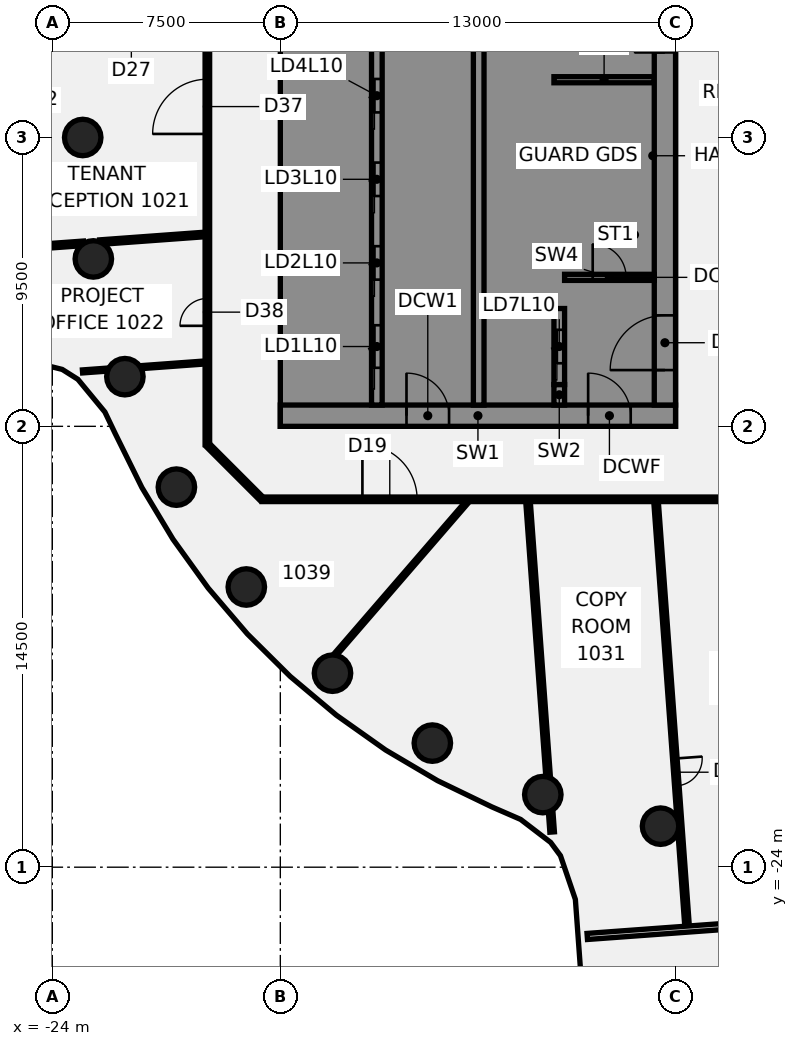
"""IFC4 building model, lengths in metres.
Left out: names, types, materials, properties, quantities, classifications, styles, units other than length and angle.
Written with IfcOpenShell. Run it as: python <this file> out.ifc"""

import sys

from ifc_helpers import new_model, si_unit, direction, frame, frame_2d, origin, origin_2d, place, context, subcontext, project, spatial, polyline, rectangle, circle, outline, extrude, element, fill, save


model = new_model("IFC4")
c1 = context("Model", 3, precision=1e-05, world=origin(), true_north=direction((0.0, 1.0)))
c2 = subcontext(c1, "Body", "Model", "MODEL_VIEW")
j1 = project(units=[si_unit("LENGTHUNIT", "METRE"), si_unit("PLANEANGLEUNIT", "RADIAN")], contexts=[c1])
p1 = place(None, origin())
s1 = spatial("IfcSite", under=j1, at=p1, CompositionType="ELEMENT")
p2 = place(p1, origin())
s2 = spatial("IfcBuilding", under=s1, at=p2, CompositionType="ELEMENT")
p3 = place(p2, frame((0.0, 0.0, 49.0)))
s3 = spatial("IfcBuildingStorey", under=s2, at=p3, CompositionType="ELEMENT", Elevation=49.0)
for number, where, z_axis, x_axis in (
    (1, (-23.0, 0.0, -0.14), (0.0, 0.0, 1.0), (1.0, 0.0, 0.0)),
    (2, (-22.651, -3.994, -0.14), (0.0, 0.0, 1.0), (1.0, 0.0, 0.0)),
    (3, (-21.613, -7.866, -0.14), (0.0, 0.0, 1.0), (1.0, 0.0, 0.0)),
    (4, (-19.919, -11.5, -0.14), (0.0, 0.0, 1.0), (1.0, 0.0, 0.0)),
    (5, (-17.619, -14.784, -0.14), (0.0, 0.0, 1.0), (1.0, 0.0, 0.0)),
    (6, (-14.784, -17.619, -0.14), (0.0, 0.0, 1.0), (1.0, 0.0, 0.0)),
    (7, (-11.5, -19.919, -0.14), (0.0, 0.0, 1.0), (1.0, 0.0, 0.0)),
    (8, (-7.866, -21.613, -0.14), (0.0, 0.0, 1.0), (1.0, 0.0, 0.0)),
    (9, (-3.994, -22.651, -0.14), (0.0, 0.0, 1.0), (1.0, 0.0, 0.0)),
):
    element("IfcColumn", number, at=place(p3, frame(where, z_axis=z_axis, x_axis=x_axis)), inside=s3, PredefinedType="COLUMN", context=c2, shape_type="SweptSolid", body=[
        extrude(circle(Radius=0.6, at=origin_2d()), origin(), (0.0, 0.0, 1.0), 3.75),
    ])
p4 = place(p3, frame((-8.353, -11.965, 0.0), z_axis=(0.0, 0.0, 1.0), x_axis=(0.072816342266, -0.99734536661, 0.0)))
e10 = element("IfcWall", 10, at=p4, inside=s3, PredefinedType="PARTITIONING", context=c2, shape_type="SweptSolid", body=[
    extrude(rectangle(XDim=9.11, YDim=0.15, at=frame_2d((4.555, 0.0))), origin(), (0.0, 0.0, 1.0), 3.01),
])
p5 = place(p3, frame((-7.609, -22.154, 0.0), z_axis=(0.0, 0.0, 1.0), x_axis=(0.072804156196, -0.997346256242, 0.0)))
e11 = element("IfcWall", 11, at=p5, inside=s3, PredefinedType="PARTITIONING", context=c2, shape_type="SweptSolid", body=[
    extrude(rectangle(XDim=0.691, YDim=0.15, at=frame_2d((0.345, 0.0))), origin(), (0.0, 0.0, 1.0), 3.01),
])
p6 = place(p3, frame((-4.142, -11.965, 0.0), z_axis=(0.0, 0.0, 1.0), x_axis=(0.072880977725, -0.99734064546, 0.0)))
e12 = element("IfcWall", 12, at=p6, inside=s3, PredefinedType="PARTITIONING", context=c2, shape_type="SweptSolid", body=[
    extrude(rectangle(XDim=14.016, YDim=0.15, at=frame_2d((7.008, 0.0))), origin(), (0.0, 0.0, 1.0), 3.01),
])
p7 = place(p6, frame((8.485, 0.0, 0.0)))
e13 = element("IfcOpeningElement", 13, at=p7, cuts=e12, PredefinedType="OPENING", context=c2, shape_type="SweptSolid", body=[
    extrude(rectangle(XDim=0.9, YDim=2.1, at=frame_2d((0.45, 1.05))), frame((0.0, 0.085, 0.0), z_axis=(0.0, -1.0, 0.0), x_axis=(1.0, 0.0, 0.0)), (0.0, 0.0, 1.0), 0.17),
])
p8 = place(p3, frame((-18.872, -10.128, 0.0), z_axis=(0.0, 0.0, 1.0), x_axis=(0.707106781187, -0.707106781187, 0.0)))
e14 = element("IfcWall", 14, at=p8, inside=s3, PredefinedType="PARTITIONING", context=c2, shape_type="SweptSolid", body=[
    extrude(rectangle(XDim=2.465, YDim=0.15, at=frame_2d((1.232, 0.0))), origin(), (0.0, 0.0, 1.0), 3.01),
])
p9 = place(p3, frame((-17.1, -11.9, 0.0), z_axis=(0.0, 0.0, 1.0), x_axis=(1.0, 0.0, 0.0)))
e15 = element("IfcWall", 15, at=p9, inside=s3, PredefinedType="PARTITIONING", context=c2, shape_type="SweptSolid", body=[
    extrude(rectangle(XDim=34.165, YDim=0.15, at=frame_2d((17.083, 0.0))), origin(), (0.0, 0.0, 1.0), 3.01),
])
p10 = place(p9, frame((15.503, 0.0, 0.0)))
e16 = element("IfcOpeningElement", 16, at=p10, cuts=e15, PredefinedType="OPENING", context=c2, shape_type="SweptSolid", body=[
    extrude(rectangle(XDim=1.8, YDim=2.1, at=frame_2d((0.9, 1.05))), frame((0.0, 0.085, 0.0), z_axis=(0.0, -1.0, 0.0), x_axis=(1.0, 0.0, 0.0)), (0.0, 0.0, 1.0), 0.17),
])
p11 = place(p9, frame((3.3, 0.0, 0.0)))
e17 = element("IfcOpeningElement", 17, at=p11, cuts=e15, PredefinedType="OPENING", context=c2, shape_type="SweptSolid", body=[
    extrude(rectangle(XDim=1.8, YDim=2.1, at=frame_2d((0.9, 1.05))), frame((0.0, 0.085, 0.0), z_axis=(0.0, -1.0, 0.0), x_axis=(1.0, 0.0, 0.0)), (0.0, 0.0, 1.0), 0.17),
])
p12 = place(p9, frame((25.782, 0.0, 0.0)))
e18 = element("IfcOpeningElement", 18, at=p12, cuts=e15, PredefinedType="OPENING", context=c2, shape_type="SweptSolid", body=[
    extrude(rectangle(XDim=1.8, YDim=2.1, at=frame_2d((0.9, 1.05))), frame((0.0, 0.085, 0.0), z_axis=(0.0, -1.0, 0.0), x_axis=(1.0, 0.0, 0.0)), (0.0, 0.0, 1.0), 0.17),
])
p13 = place(p3, frame((-25.472, -3.663, 0.0), z_axis=(0.0, 0.0, 1.0), x_axis=(0.997346837162, 0.072796197716, 0.0)))
e19 = element("IfcWall", 19, at=p13, inside=s3, PredefinedType="PARTITIONING", context=c2, shape_type="SweptSolid", body=[
    extrude(rectangle(XDim=2.509, YDim=0.15, at=frame_2d((1.254, 0.0))), origin(), (0.0, 0.0, 1.0), 3.01),
])
p14 = place(p3, frame((-22.437, -3.441, 0.0), z_axis=(0.0, 0.0, 1.0), x_axis=(0.99734640783, 0.072802079559, 0.0)))
e20 = element("IfcWall", 20, at=p14, inside=s3, PredefinedType="PARTITIONING", context=c2, shape_type="SweptSolid", body=[
    extrude(rectangle(XDim=3.481, YDim=0.15, at=frame_2d((1.74, 0.0))), origin(), (0.0, 0.0, 1.0), 3.01),
])
p15 = place(p3, frame((-23.007, -7.694, 0.0), z_axis=(0.0, 0.0, 1.0), x_axis=(0.997348002783, 0.072780226335, 0.0)))
e21 = element("IfcWall", 21, at=p15, inside=s3, PredefinedType="PARTITIONING", context=c2, shape_type="SweptSolid", body=[
    extrude(rectangle(XDim=0.849, YDim=0.1, at=frame_2d((0.424, 0.0))), origin(), (0.0, 0.0, 1.0), 3.01),
])
p16 = place(p3, frame((-21.092, -7.554, 0.0), z_axis=(0.0, 0.0, 1.0), x_axis=(0.997342635189, 0.072853744132, 0.0)))
e22 = element("IfcWall", 22, at=p16, inside=s3, PredefinedType="PARTITIONING", context=c2, shape_type="SweptSolid", body=[
    extrude(rectangle(XDim=2.138, YDim=0.1, at=frame_2d((1.069, 0.0))), origin(), (0.0, 0.0, 1.0), 3.01),
])
p17 = place(p3, frame((-6.404, -26.278, 0.0), z_axis=(0.0, 0.0, 1.0), x_axis=(0.9973396504, 0.072894593347, 0.0)))
e23 = element("IfcWall", 23, at=p17, inside=s3, PredefinedType="PARTITIONING", context=c2, shape_type="SweptSolid", body=[
    extrude(rectangle(XDim=13.447, YDim=0.2, at=frame_2d((6.724, 0.0))), origin(), (0.0, 0.0, 1.0), 3.01),
])
p18 = place(p17, frame((5.799, 0.0, 0.0)))
e24 = element("IfcOpeningElement", 24, at=p18, cuts=e23, PredefinedType="OPENING", context=c2, shape_type="SweptSolid", body=[
    extrude(rectangle(XDim=1.4, YDim=2.1, at=frame_2d((0.7, 1.05))), frame((0.0, 0.11, 0.0), z_axis=(0.0, -1.0, 0.0), x_axis=(1.0, 0.0, 0.0)), (0.0, 0.0, 1.0), 0.22),
])
p19 = place(p3, frame((-14.71, -17.029, 0.0), z_axis=(0.0, 0.0, 1.0), x_axis=(0.653745883249, 0.756714160126, 0.0)))
e25 = element("IfcWall", 25, at=p19, inside=s3, PredefinedType="PARTITIONING", context=c2, shape_type="SweptSolid", body=[
    extrude(rectangle(XDim=6.658, YDim=0.1, at=frame_2d((3.329, 0.0))), origin(), (0.0, 0.0, 1.0), 3.01),
])
p20 = place(p3, frame((-18.9, -10.1, 0.0), z_axis=(0.0, 0.0, 1.0), x_axis=(0.0, 1.0, 0.0)))
e26 = element("IfcWall", 26, at=p20, inside=s3, PredefinedType="PARTITIONING", context=c2, shape_type="SweptSolid", body=[
    extrude(rectangle(XDim=20.2, YDim=0.15, at=frame_2d((10.1, 0.0))), origin(), (0.0, 0.0, 1.0), 3.01),
])
p21 = place(p20, frame((10.217, 0.0, 0.0)))
e27 = element("IfcOpeningElement", 27, at=p21, cuts=e26, PredefinedType="OPENING", context=c2, shape_type="SweptSolid", body=[
    extrude(rectangle(XDim=1.8, YDim=2.1, at=frame_2d((0.9, 1.05))), frame((0.0, 0.085, 0.0), z_axis=(0.0, -1.0, 0.0), x_axis=(1.0, 0.0, 0.0)), (0.0, 0.0, 1.0), 0.17),
])
p22 = place(p20, frame((3.906, 0.0, 0.0)))
e28 = element("IfcOpeningElement", 28, at=p22, cuts=e26, PredefinedType="OPENING", context=c2, shape_type="SweptSolid", body=[
    extrude(rectangle(XDim=0.9, YDim=2.1, at=frame_2d((0.45, 1.05))), frame((0.0, 0.085, 0.0), z_axis=(0.0, -1.0, 0.0), x_axis=(1.0, 0.0, 0.0)), (0.0, 0.0, 1.0), 0.17),
])
p23 = place(p3, frame((-16.5, -9.15, 0.0), z_axis=(0.0, 0.0, 1.0), x_axis=(1.0, 0.0, 0.0)))
e29 = element("IfcWall", 29, at=p23, inside=s3, PredefinedType="SHEAR", context=c2, shape_type="SweptSolid", body=[
    extrude(rectangle(XDim=13.0, YDim=0.7, at=frame_2d((6.5, 0.0))), origin(), (0.0, 0.0, 1.0), 3.61),
])
p24 = place(p23, frame((4.15, 0.0, 0.0)))
e30 = element("IfcOpeningElement", 30, at=p24, cuts=e29, PredefinedType="OPENING", context=c2, shape_type="SweptSolid", body=[
    extrude(rectangle(XDim=1.4, YDim=2.1, at=frame_2d((0.7, 1.05))), frame((0.0, 0.36, 0.0), z_axis=(0.0, -1.0, 0.0), x_axis=(1.0, 0.0, 0.0)), (0.0, 0.0, 1.0), 0.72),
])
p25 = place(p23, frame((10.125, 0.0, 0.0)))
e31 = element("IfcOpeningElement", 31, at=p25, cuts=e29, PredefinedType="OPENING", context=c2, shape_type="SweptSolid", body=[
    extrude(rectangle(XDim=1.4, YDim=2.1, at=frame_2d((0.7, 1.05))), frame((0.0, 0.36, 0.0), z_axis=(0.0, -1.0, 0.0), x_axis=(1.0, 0.0, 0.0)), (0.0, 0.0, 1.0), 0.72),
])
p26 = place(p3, origin())
e32 = element("IfcWall", 32, at=p26, inside=s3, PredefinedType="SHEAR", context=c2, shape_type="SweptSolid", body=[
    extrude(outline(polyline([(-13.5, -8.8), (-13.5, -8.125), (-15.8, -8.125), (-15.8, -5.625), (-13.5, -5.625), (-13.5, -5.375), (-15.8, -5.375), (-15.8, -2.875), (-13.5, -2.875), (-13.5, -2.625), (-15.8, -2.625), (-15.8, -0.125), (-13.5, -0.125), (-13.5, 0.125), (-15.8, 0.125), (-15.8, 2.625), (-13.5, 2.625), (-13.5, 2.875), (-15.8, 2.875), (-15.8, 5.375), (-13.5, 5.375), (-13.5, 5.625), (-15.8, 5.625), (-15.8, 8.125), (-13.5, 8.125), (-13.5, 8.8), (-15.8, 8.8), (-16.5, 8.8), (-16.5, -8.8), (-15.8, -8.8), (-13.5, -8.8)])), origin(), (0.0, 0.0, 1.0), 3.61),
])
p27 = place(p3, origin())
e33 = element("IfcWall", 33, at=p27, inside=s3, PredefinedType="SHEAR", context=c2, shape_type="SweptSolid", body=[
    extrude(outline(polyline([(-9.8, -5.375), (-9.8, -5.625), (-7.5, -5.625), (-7.15, -5.625), (-7.15, 8.8), (-7.5, 8.8), (-9.8, 8.8), (-9.8, 8.125), (-7.5, 8.125), (-7.5, 5.625), (-9.8, 5.625), (-9.8, 5.375), (-7.5, 5.375), (-7.5, 2.875), (-9.8, 2.875), (-9.8, 2.625), (-7.5, 2.625), (-7.5, 0.125), (-9.8, 0.125), (-9.8, -0.125), (-7.5, -0.125), (-7.5, -2.625), (-9.8, -2.625), (-9.8, -2.875), (-7.5, -2.875), (-7.5, -5.375), (-9.8, -5.375)])), origin(), (0.0, 0.0, 1.0), 3.61),
])
p28 = place(p3, origin())
e34 = element("IfcWall", 34, at=p28, inside=s3, PredefinedType="SHEAR", context=c2, shape_type="SweptSolid", body=[
    extrude(outline(polyline([(-7.5, -8.125), (-9.55, -8.125), (-9.55, -5.625), (-9.8, -5.625), (-9.8, -8.125), (-9.8, -8.8), (-7.5, -8.8), (-7.5, -8.125)])), origin(), (0.0, 0.0, 1.0), 3.61),
])
p29 = place(p3, frame((-7.325, -8.8, 0.0), z_axis=(0.0, 0.0, 1.0), x_axis=(0.0, 1.0, 0.0)))
e35 = element("IfcWall", 35, at=p29, inside=s3, PredefinedType="SHEAR", context=c2, shape_type="SweptSolid", body=[
    extrude(rectangle(XDim=0.675, YDim=0.35, at=frame_2d((0.337, 0.0))), origin(), (0.0, 0.0, 1.0), 3.61),
])
p30 = place(p3, frame((-7.5, 1.9, 0.0), z_axis=(0.0, 0.0, 1.0), x_axis=(1.0, 0.0, 0.0)))
e36 = element("IfcWall", 36, at=p30, inside=s3, PredefinedType="SHEAR", context=c2, shape_type="SweptSolid", body=[
    extrude(rectangle(XDim=3.3, YDim=0.2, at=frame_2d((1.65, 0.0))), origin(), (0.0, 0.0, 1.0), 3.61),
])
p31 = place(p3, frame((-13.325, -8.8, 0.0), z_axis=(0.0, 0.0, 1.0), x_axis=(0.0, 1.0, 0.0)))
e37 = element("IfcWall", 37, at=p31, inside=s3, PredefinedType="SHEAR", context=c2, shape_type="SweptSolid", body=[
    extrude(rectangle(XDim=17.6, YDim=0.35, at=frame_2d((8.8, 0.0))), origin(), (0.0, 0.0, 1.0), 3.61),
])
p32 = place(p31, frame((1.225, 0.0, 0.0)))
e38 = element("IfcOpeningElement", 38, at=p32, cuts=e37, PredefinedType="OPENING", context=c2, shape_type="SweptSolid", body=[
    extrude(rectangle(XDim=1.4, YDim=2.1, at=frame_2d((0.7, 1.05))), frame((0.0, 0.185, 0.0), z_axis=(0.0, -1.0, 0.0), x_axis=(1.0, 0.0, 0.0)), (0.0, 0.0, 1.0), 0.37),
])
p33 = place(p31, frame((4.125, 0.0, 0.0)))
e39 = element("IfcOpeningElement", 39, at=p33, cuts=e37, PredefinedType="OPENING", context=c2, shape_type="SweptSolid", body=[
    extrude(rectangle(XDim=1.1, YDim=2.1, at=frame_2d((0.55, 1.05))), frame((0.0, 0.185, 0.0), z_axis=(0.0, -1.0, 0.0), x_axis=(1.0, 0.0, 0.0)), (0.0, 0.0, 1.0), 0.37),
])
p34 = place(p31, frame((6.875, 0.0, 0.0)))
e40 = element("IfcOpeningElement", 40, at=p34, cuts=e37, PredefinedType="OPENING", context=c2, shape_type="SweptSolid", body=[
    extrude(rectangle(XDim=1.1, YDim=2.1, at=frame_2d((0.55, 1.05))), frame((0.0, 0.185, 0.0), z_axis=(0.0, -1.0, 0.0), x_axis=(1.0, 0.0, 0.0)), (0.0, 0.0, 1.0), 0.37),
])
p35 = place(p31, frame((9.625, 0.0, 0.0)))
e41 = element("IfcOpeningElement", 41, at=p35, cuts=e37, PredefinedType="OPENING", context=c2, shape_type="SweptSolid", body=[
    extrude(rectangle(XDim=1.1, YDim=2.1, at=frame_2d((0.55, 1.05))), frame((0.0, 0.185, 0.0), z_axis=(0.0, -1.0, 0.0), x_axis=(1.0, 0.0, 0.0)), (0.0, 0.0, 1.0), 0.37),
])
p36 = place(p31, frame((12.375, 0.0, 0.0)))
e42 = element("IfcOpeningElement", 42, at=p36, cuts=e37, PredefinedType="OPENING", context=c2, shape_type="SweptSolid", body=[
    extrude(rectangle(XDim=1.1, YDim=2.1, at=frame_2d((0.55, 1.05))), frame((0.0, 0.185, 0.0), z_axis=(0.0, -1.0, 0.0), x_axis=(1.0, 0.0, 0.0)), (0.0, 0.0, 1.0), 0.37),
])
p37 = place(p3, frame((-9.975, -8.8, 0.0), z_axis=(0.0, 0.0, 1.0), x_axis=(0.0, 1.0, 0.0)))
e43 = element("IfcWall", 43, at=p37, inside=s3, PredefinedType="SHEAR", context=c2, shape_type="SweptSolid", body=[
    extrude(rectangle(XDim=17.6, YDim=0.35, at=frame_2d((8.8, 0.0))), origin(), (0.0, 0.0, 1.0), 3.61),
])
p38 = place(p3, frame((-7.325, -8.125, 0.0), z_axis=(0.0, 0.0, 1.0), x_axis=(0.0, 1.0, 0.0)))
e44 = element("IfcWall", 44, at=p38, inside=s3, PredefinedType="SHEAR", context=c2, shape_type="SweptSolid", body=[
    extrude(rectangle(XDim=2.5, YDim=0.35, at=frame_2d((1.25, 0.0))), origin(), (0.0, 0.0, 1.0), 3.61),
])
p39 = place(p38, frame((0.7, 0.0, 0.0)))
e45 = element("IfcOpeningElement", 45, at=p39, cuts=e44, PredefinedType="OPENING", context=c2, shape_type="SweptSolid", body=[
    extrude(rectangle(XDim=1.1, YDim=2.1, at=frame_2d((0.55, 1.05))), frame((0.0, 0.185, 0.0), z_axis=(0.0, -1.0, 0.0), x_axis=(1.0, 0.0, 0.0)), (0.0, 0.0, 1.0), 0.37),
])
p40 = place(p3, frame((-3.85, -8.8, 0.0), z_axis=(0.0, 0.0, 1.0), x_axis=(0.0, 1.0, 0.0)))
e46 = element("IfcWall", 46, at=p40, inside=s3, PredefinedType="SHEAR", context=c2, shape_type="SweptSolid", body=[
    extrude(rectangle(XDim=17.6, YDim=0.7, at=frame_2d((8.8, 0.0))), origin(), (0.0, 0.0, 1.0), 3.61),
])
p41 = place(p40, frame((1.15, 0.0, 0.0)))
e47 = element("IfcOpeningElement", 47, at=p41, cuts=e46, PredefinedType="OPENING", context=c2, shape_type="SweptSolid", body=[
    extrude(rectangle(XDim=1.8, YDim=2.1, at=frame_2d((0.9, 1.05))), frame((0.0, 0.36, 0.0), z_axis=(0.0, -1.0, 0.0), x_axis=(1.0, 0.0, 0.0)), (0.0, 0.0, 1.0), 0.72),
])
p42 = place(p40, frame((11.597, 0.0, 0.0)))
e48 = element("IfcOpeningElement", 48, at=p42, cuts=e46, PredefinedType="OPENING", context=c2, shape_type="SweptSolid", body=[
    extrude(rectangle(XDim=1.0, YDim=2.1, at=frame_2d((0.5, 1.05))), frame((0.0, 0.36, 0.0), z_axis=(0.0, -1.0, 0.0), x_axis=(1.0, 0.0, 0.0)), (0.0, 0.0, 1.0), 0.72),
])
p43 = place(p40, frame((15.123, 0.0, 0.0)))
e49 = element("IfcOpeningElement", 49, at=p43, cuts=e46, PredefinedType="OPENING", context=c2, shape_type="SweptSolid", body=[
    extrude(rectangle(XDim=1.0, YDim=2.1, at=frame_2d((0.5, 1.05))), frame((0.0, 0.36, 0.0), z_axis=(0.0, -1.0, 0.0), x_axis=(1.0, 0.0, 0.0)), (0.0, 0.0, 1.0), 0.72),
])
p44 = place(p3, frame((-7.15, -4.6, 0.0), z_axis=(0.0, 0.0, 1.0), x_axis=(1.0, 0.0, 0.0)))
e50 = element("IfcWall", 50, at=p44, inside=s3, PredefinedType="SHEAR", context=c2, shape_type="SweptSolid", body=[
    extrude(rectangle(XDim=2.95, YDim=0.2, at=frame_2d((1.475, 0.0))), origin(), (0.0, 0.0, 1.0), 3.61),
])
p45 = place(p44, frame((0.925, 0.0, 0.0)))
e51 = element("IfcOpeningElement", 51, at=p45, cuts=e50, PredefinedType="OPENING", context=c2, shape_type="SweptSolid", body=[
    extrude(rectangle(XDim=1.1, YDim=2.1, at=frame_2d((0.55, 1.05))), frame((0.0, 0.11, 0.0), z_axis=(0.0, -1.0, 0.0), x_axis=(1.0, 0.0, 0.0)), (0.0, 0.0, 1.0), 0.22),
])
p46 = place(p7, frame((0.9, 0.0, 0.0), z_axis=(0.0, 0.0, 1.0), x_axis=(-1.0, 0.0, 0.0)))
e52 = element("IfcDoor", 52, at=p46, inside=s3, OperationType="SINGLE_SWING_RIGHT", PredefinedType="DOOR", context=c2, shape_type="SweptSolid", body=[
    extrude(rectangle(XDim=0.9, YDim=2.1, at=frame_2d((0.45, 1.05))), frame((0.0, 0.025, 0.0), z_axis=(0.0, -1.0, 0.0), x_axis=(1.0, 0.0, 0.0)), (0.0, 0.0, 1.0), 0.05),
])
fill(e13, e52)
p47 = place(p11, frame((1.8, 0.0, 0.0), z_axis=(0.0, 0.0, 1.0), x_axis=(-1.0, 0.0, 0.0)))
e53 = element("IfcDoor", 53, at=p47, inside=s3, OperationType="DOUBLE_DOOR_SINGLE_SWING", PredefinedType="DOOR", context=c2, shape_type="SweptSolid", body=[
    extrude(rectangle(XDim=1.8, YDim=2.1, at=frame_2d((0.9, 1.05))), frame((0.0, 0.025, 0.0), z_axis=(0.0, -1.0, 0.0), x_axis=(1.0, 0.0, 0.0)), (0.0, 0.0, 1.0), 0.05),
])
fill(e17, e53)
p48 = place(p21, frame((1.8, 0.0, 0.0), z_axis=(0.0, 0.0, 1.0), x_axis=(-1.0, 0.0, 0.0)))
e54 = element("IfcDoor", 54, at=p48, inside=s3, OperationType="DOUBLE_DOOR_SINGLE_SWING", PredefinedType="DOOR", context=c2, shape_type="SweptSolid", body=[
    extrude(rectangle(XDim=1.8, YDim=2.1, at=frame_2d((0.9, 1.05))), frame((0.0, 0.025, 0.0), z_axis=(0.0, -1.0, 0.0), x_axis=(1.0, 0.0, 0.0)), (0.0, 0.0, 1.0), 0.05),
])
fill(e27, e54)
p49 = place(p22, origin())
e55 = element("IfcDoor", 55, at=p49, inside=s3, OperationType="SINGLE_SWING_RIGHT", PredefinedType="DOOR", context=c2, shape_type="SweptSolid", body=[
    extrude(rectangle(XDim=0.9, YDim=2.1, at=frame_2d((0.45, 1.05))), frame((0.0, 0.025, 0.0), z_axis=(0.0, -1.0, 0.0), x_axis=(1.0, 0.0, 0.0)), (0.0, 0.0, 1.0), 0.05),
])
fill(e28, e55)
p50 = place(p24, origin())
e56 = element("IfcDoor", 56, at=p50, inside=s3, OperationType="SINGLE_SWING_LEFT", PredefinedType="DOOR", context=c2, shape_type="SweptSolid", body=[
    extrude(rectangle(XDim=1.4, YDim=2.1, at=frame_2d((0.7, 1.05))), frame((0.0, 0.025, 0.0), z_axis=(0.0, -1.0, 0.0), x_axis=(1.0, 0.0, 0.0)), (0.0, 0.0, 1.0), 0.05),
])
fill(e30, e56)
p51 = place(p25, origin())
e57 = element("IfcDoor", 57, at=p51, inside=s3, OperationType="SINGLE_SWING_LEFT", PredefinedType="DOOR", context=c2, shape_type="SweptSolid", body=[
    extrude(rectangle(XDim=1.4, YDim=2.1, at=frame_2d((0.7, 1.05))), frame((0.0, 0.025, 0.0), z_axis=(0.0, -1.0, 0.0), x_axis=(1.0, 0.0, 0.0)), (0.0, 0.0, 1.0), 0.05),
])
fill(e31, e57)
p52 = place(p41, origin())
e58 = element("IfcDoor", 58, at=p52, inside=s3, OperationType="SINGLE_SWING_LEFT", PredefinedType="DOOR", context=c2, shape_type="SweptSolid", body=[
    extrude(rectangle(XDim=1.8, YDim=2.1, at=frame_2d((0.9, 1.05))), frame((0.0, 0.025, 0.0), z_axis=(0.0, -1.0, 0.0), x_axis=(1.0, 0.0, 0.0)), (0.0, 0.0, 1.0), 0.05),
])
fill(e47, e58)
p53 = place(p42, origin())
e59 = element("IfcDoor", 59, at=p53, inside=s3, OperationType="SINGLE_SWING_LEFT", PredefinedType="DOOR", context=c2, shape_type="SweptSolid", body=[
    extrude(rectangle(XDim=1.0, YDim=2.1, at=frame_2d((0.5, 1.05))), frame((0.0, 0.325, 0.0), z_axis=(0.0, -1.0, 0.0), x_axis=(1.0, 0.0, 0.0)), (0.0, 0.0, 1.0), 0.05),
])
fill(e48, e59)
p54 = place(p45, origin())
e60 = element("IfcDoor", 60, at=p54, inside=s3, OperationType="SINGLE_SWING_LEFT", PredefinedType="DOOR", context=c2, shape_type="SweptSolid", body=[
    extrude(rectangle(XDim=1.1, YDim=2.1, at=frame_2d((0.55, 1.05))), frame((0.0, 0.025, 0.0), z_axis=(0.0, -1.0, 0.0), x_axis=(1.0, 0.0, 0.0)), (0.0, 0.0, 1.0), 0.05),
])
fill(e51, e60)
p55 = place(p32, origin())
e61 = element("IfcDoor", 61, at=p55, inside=s3, OperationType="SLIDING_TO_LEFT", PredefinedType="DOOR", context=c2, shape_type="SweptSolid", body=[
    extrude(rectangle(XDim=1.4, YDim=2.1, at=frame_2d((0.7, 1.05))), frame((0.0, 0.025, 0.0), z_axis=(0.0, -1.0, 0.0), x_axis=(1.0, 0.0, 0.0)), (0.0, 0.0, 1.0), 0.05),
])
fill(e38, e61)
p56 = place(p33, origin())
e62 = element("IfcDoor", 62, at=p56, inside=s3, OperationType="SLIDING_TO_LEFT", PredefinedType="DOOR", context=c2, shape_type="SweptSolid", body=[
    extrude(rectangle(XDim=1.1, YDim=2.1, at=frame_2d((0.55, 1.05))), frame((0.0, 0.025, 0.0), z_axis=(0.0, -1.0, 0.0), x_axis=(1.0, 0.0, 0.0)), (0.0, 0.0, 1.0), 0.05),
])
fill(e39, e62)
p57 = place(p34, origin())
e63 = element("IfcDoor", 63, at=p57, inside=s3, OperationType="SLIDING_TO_LEFT", PredefinedType="DOOR", context=c2, shape_type="SweptSolid", body=[
    extrude(rectangle(XDim=1.1, YDim=2.1, at=frame_2d((0.55, 1.05))), frame((0.0, 0.025, 0.0), z_axis=(0.0, -1.0, 0.0), x_axis=(1.0, 0.0, 0.0)), (0.0, 0.0, 1.0), 0.05),
])
fill(e40, e63)
p58 = place(p35, origin())
e64 = element("IfcDoor", 64, at=p58, inside=s3, OperationType="SLIDING_TO_LEFT", PredefinedType="DOOR", context=c2, shape_type="SweptSolid", body=[
    extrude(rectangle(XDim=1.1, YDim=2.1, at=frame_2d((0.55, 1.05))), frame((0.0, 0.025, 0.0), z_axis=(0.0, -1.0, 0.0), x_axis=(1.0, 0.0, 0.0)), (0.0, 0.0, 1.0), 0.05),
])
fill(e41, e64)
p59 = place(p39, origin())
e65 = element("IfcDoor", 65, at=p59, inside=s3, OperationType="SLIDING_TO_LEFT", PredefinedType="DOOR", context=c2, shape_type="SweptSolid", body=[
    extrude(rectangle(XDim=1.1, YDim=2.1, at=frame_2d((0.55, 1.05))), frame((0.0, 0.025, 0.0), z_axis=(0.0, -1.0, 0.0), x_axis=(1.0, 0.0, 0.0)), (0.0, 0.0, 1.0), 0.05),
])
fill(e45, e65)
save(model, sys.argv[1])
